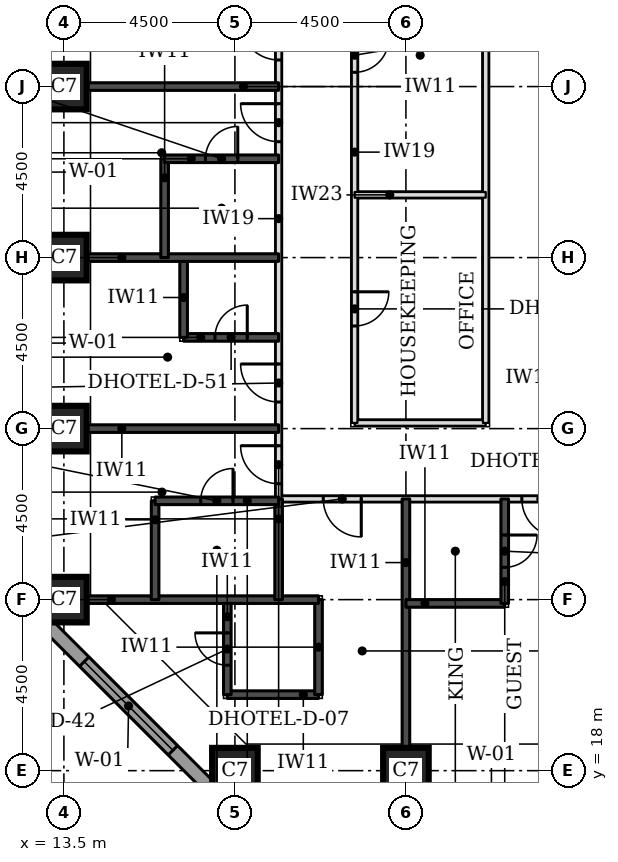
"""IFC4 building model, lengths in metres.
Left out: names, types, materials, properties, quantities, classifications, styles, units other than length and angle.
Written with IfcOpenShell. Run it as: python <this file> out.ifc"""

import sys

from ifc_helpers import new_model, si_unit, direction, frame, frame_2d, origin, origin_2d, place, context, subcontext, project, spatial, rectangle, extrude, element, fill, save


model = new_model("IFC4")
c1 = context("Model", 3, precision=1e-05, world=origin(), true_north=direction((0.0, 1.0)))
c2 = subcontext(c1, "Body", "Model", "MODEL_VIEW")
j1 = project(units=[si_unit("LENGTHUNIT", "METRE"), si_unit("PLANEANGLEUNIT", "RADIAN")], contexts=[c1])
p1 = place(None, origin())
s1 = spatial("IfcSite", under=j1, at=p1, CompositionType="ELEMENT")
p2 = place(p1, origin())
s2 = spatial("IfcBuilding", under=s1, at=p2, CompositionType="ELEMENT")
p3 = place(p2, frame((0.0, 0.0, 59.4)))
s3 = spatial("IfcBuildingStorey", under=s2, at=p3, CompositionType="ELEMENT", Elevation=59.4)
for number, where, z_axis, x_axis in (
    (1, (18.0, 18.0, 0.0), (0.0, 0.0, 1.0), (1.0, 0.0, 0.0)),
    (2, (22.5, 18.0, 0.0), (0.0, 0.0, 1.0), (1.0, 0.0, 0.0)),
    (3, (13.5, 22.5, 0.0), (0.0, 0.0, 1.0), (1.0, 0.0, 0.0)),
    (4, (13.5, 27.0, 0.0), (0.0, 0.0, 1.0), (1.0, 0.0, 0.0)),
    (5, (13.5, 31.5, 0.0), (0.0, 0.0, 1.0), (1.0, 0.0, 0.0)),
    (6, (13.5, 36.0, 0.0), (0.0, 0.0, 1.0), (1.0, 0.0, 0.0)),
):
    element("IfcColumn", number, at=place(p3, frame(where, z_axis=z_axis, x_axis=x_axis)), inside=s3, PredefinedType="COLUMN", context=c2, shape_type="SweptSolid", body=[
        extrude(rectangle(XDim=1.2, YDim=1.2, at=origin_2d()), origin(), (0.0, 0.0, 1.0), 3.3),
    ])
p4 = place(p3, frame((12.674, 22.23, 0.0), z_axis=(0.0, 0.0, 1.0), x_axis=(0.707106781187, -0.707106781187, 0.0)))
e7 = element("IfcWall", 7, at=p4, inside=s3, PredefinedType="STANDARD", context=c2, shape_type="SweptSolid", body=[
    extrude(rectangle(XDim=7.151, YDim=0.35, at=frame_2d((3.576, 0.0))), origin(), (0.0, 0.0, 1.0), 3.055),
])
p5 = place(p4, frame((1.926, 0.0, 0.8)))
e8 = element("IfcOpeningElement", 8, at=p5, cuts=e7, PredefinedType="OPENING", context=c2, shape_type="SweptSolid", body=[
    extrude(rectangle(XDim=3.3, YDim=1.5, at=frame_2d((1.65, 0.75))), frame((0.0, 0.185, 0.0), z_axis=(0.0, -1.0, 0.0), x_axis=(1.0, 0.0, 0.0)), (0.0, 0.0, 1.0), 0.37),
])
p6 = place(p3, frame((19.15, 25.15, 0.0), z_axis=(0.0, 0.0, 1.0), x_axis=(1.0, 0.0, 0.0)))
e9 = element("IfcWall", 9, at=p6, inside=s3, PredefinedType="PARTITIONING", context=c2, shape_type="SweptSolid", body=[
    extrude(rectangle(XDim=32.35, YDim=0.15, at=frame_2d((16.175, 0.0))), origin(), (0.0, 0.0, 1.0), 3.08),
])
p7 = place(p6, frame((6.4, 0.0, 0.0)))
e10 = element("IfcOpeningElement", 10, at=p7, cuts=e9, PredefinedType="OPENING", context=c2, shape_type="SweptSolid", body=[
    extrude(rectangle(XDim=1.0, YDim=2.1, at=frame_2d((0.5, 1.05))), frame((0.0, 0.085, 0.0), z_axis=(0.0, -1.0, 0.0), x_axis=(1.0, 0.0, 0.0)), (0.0, 0.0, 1.0), 0.17),
])
p8 = place(p6, frame((10.5, 0.0, 0.0)))
e11 = element("IfcOpeningElement", 11, at=p8, cuts=e9, PredefinedType="OPENING", context=c2, shape_type="SweptSolid", body=[
    extrude(rectangle(XDim=1.0, YDim=2.1, at=frame_2d((0.5, 1.05))), frame((0.0, 0.085, 0.0), z_axis=(0.0, -1.0, 0.0), x_axis=(1.0, 0.0, 0.0)), (0.0, 0.0, 1.0), 0.17),
])
p9 = place(p6, frame((22.45, 0.0, 0.0)))
e12 = element("IfcOpeningElement", 12, at=p9, cuts=e9, PredefinedType="OPENING", context=c2, shape_type="SweptSolid", body=[
    extrude(rectangle(XDim=1.0, YDim=2.1, at=frame_2d((0.5, 1.05))), frame((0.0, 0.085, 0.0), z_axis=(0.0, -1.0, 0.0), x_axis=(1.0, 0.0, 0.0)), (0.0, 0.0, 1.0), 0.17),
])
p10 = place(p6, frame((26.55, 0.0, 0.0)))
e13 = element("IfcOpeningElement", 13, at=p10, cuts=e9, PredefinedType="OPENING", context=c2, shape_type="SweptSolid", body=[
    extrude(rectangle(XDim=1.0, YDim=2.1, at=frame_2d((0.5, 1.05))), frame((0.0, 0.085, 0.0), z_axis=(0.0, -1.0, 0.0), x_axis=(1.0, 0.0, 0.0)), (0.0, 0.0, 1.0), 0.17),
])
p11 = place(p6, frame((1.175, 0.0, 0.0)))
e14 = element("IfcOpeningElement", 14, at=p11, cuts=e9, PredefinedType="OPENING", context=c2, shape_type="SweptSolid", body=[
    extrude(rectangle(XDim=1.0, YDim=2.1, at=frame_2d((0.5, 1.05))), frame((0.0, 0.085, 0.0), z_axis=(0.0, -1.0, 0.0), x_axis=(1.0, 0.0, 0.0)), (0.0, 0.0, 1.0), 0.17),
])
p12 = place(p6, frame((30.85, 0.0, 0.0)))
e15 = element("IfcOpeningElement", 15, at=p12, cuts=e9, PredefinedType="OPENING", context=c2, shape_type="SweptSolid", body=[
    extrude(rectangle(XDim=1.0, YDim=2.1, at=frame_2d((0.5, 1.05))), frame((0.0, 0.085, 0.0), z_axis=(0.0, -1.0, 0.0), x_axis=(1.0, 0.0, 0.0)), (0.0, 0.0, 1.0), 0.17),
])
p13 = place(p3, frame((19.15, 25.15, 0.0), z_axis=(0.0, 0.0, 1.0), x_axis=(0.0, 1.0, 0.0)))
e16 = element("IfcWall", 16, at=p13, inside=s3, PredefinedType="PARTITIONING", context=c2, shape_type="SweptSolid", body=[
    extrude(rectangle(XDim=24.35, YDim=0.15, at=frame_2d((12.175, 0.0))), origin(), (0.0, 0.0, 1.0), 3.08),
])
p14 = place(p13, frame((0.4, 0.0, 0.0)))
e17 = element("IfcOpeningElement", 17, at=p14, cuts=e16, PredefinedType="OPENING", context=c2, shape_type="SweptSolid", body=[
    extrude(rectangle(XDim=1.0, YDim=2.1, at=frame_2d((0.5, 1.05))), frame((0.0, 0.085, 0.0), z_axis=(0.0, -1.0, 0.0), x_axis=(1.0, 0.0, 0.0)), (0.0, 0.0, 1.0), 0.17),
])
p15 = place(p13, frame((2.55, 0.0, 0.0)))
e18 = element("IfcOpeningElement", 18, at=p15, cuts=e16, PredefinedType="OPENING", context=c2, shape_type="SweptSolid", body=[
    extrude(rectangle(XDim=1.0, YDim=2.1, at=frame_2d((0.5, 1.05))), frame((0.0, 0.085, 0.0), z_axis=(0.0, -1.0, 0.0), x_axis=(1.0, 0.0, 0.0)), (0.0, 0.0, 1.0), 0.17),
])
p16 = place(p13, frame((9.4, 0.0, 0.0)))
e19 = element("IfcOpeningElement", 19, at=p16, cuts=e16, PredefinedType="OPENING", context=c2, shape_type="SweptSolid", body=[
    extrude(rectangle(XDim=1.0, YDim=2.1, at=frame_2d((0.5, 1.05))), frame((0.0, 0.085, 0.0), z_axis=(0.0, -1.0, 0.0), x_axis=(1.0, 0.0, 0.0)), (0.0, 0.0, 1.0), 0.17),
])
p17 = place(p13, frame((11.55, 0.0, 0.0)))
e20 = element("IfcOpeningElement", 20, at=p17, cuts=e16, PredefinedType="OPENING", context=c2, shape_type="SweptSolid", body=[
    extrude(rectangle(XDim=1.0, YDim=2.1, at=frame_2d((0.5, 1.05))), frame((0.0, 0.085, 0.0), z_axis=(0.0, -1.0, 0.0), x_axis=(1.0, 0.0, 0.0)), (0.0, 0.0, 1.0), 0.17),
])
p18 = place(p13, frame((18.4, 0.0, 0.0)))
e21 = element("IfcOpeningElement", 21, at=p18, cuts=e16, PredefinedType="OPENING", context=c2, shape_type="SweptSolid", body=[
    extrude(rectangle(XDim=1.0, YDim=2.1, at=frame_2d((0.5, 1.05))), frame((0.0, 0.085, 0.0), z_axis=(0.0, -1.0, 0.0), x_axis=(1.0, 0.0, 0.0)), (0.0, 0.0, 1.0), 0.17),
])
p19 = place(p13, frame((20.55, 0.0, 0.0)))
e22 = element("IfcOpeningElement", 22, at=p19, cuts=e16, PredefinedType="OPENING", context=c2, shape_type="SweptSolid", body=[
    extrude(rectangle(XDim=1.0, YDim=2.1, at=frame_2d((0.5, 1.05))), frame((0.0, 0.085, 0.0), z_axis=(0.0, -1.0, 0.0), x_axis=(1.0, 0.0, 0.0)), (0.0, 0.0, 1.0), 0.17),
])
p20 = place(p3, frame((21.15, 27.15, 0.0), z_axis=(0.0, 0.0, 1.0), x_axis=(1.0, 0.0, 0.0)))
e23 = element("IfcWall", 23, at=p20, inside=s3, PredefinedType="PARTITIONING", context=c2, shape_type="SweptSolid", body=[
    extrude(rectangle(XDim=3.45, YDim=0.15, at=frame_2d((1.725, 0.0))), origin(), (0.0, 0.0, 1.0), 3.08),
])
p21 = place(p3, frame((21.15, 27.15, 0.0), z_axis=(0.0, 0.0, 1.0), x_axis=(0.0, 1.0, 0.0)))
e24 = element("IfcWall", 24, at=p21, inside=s3, PredefinedType="PARTITIONING", context=c2, shape_type="SweptSolid", body=[
    extrude(rectangle(XDim=15.85, YDim=0.15, at=frame_2d((7.925, 0.0))), origin(), (0.0, 0.0, 1.0), 3.08),
])
p22 = place(p21, frame((2.55, 0.0, 0.0)))
e25 = element("IfcOpeningElement", 25, at=p22, cuts=e24, PredefinedType="OPENING", context=c2, shape_type="SweptSolid", body=[
    extrude(rectangle(XDim=0.9, YDim=2.1, at=frame_2d((0.45, 1.05))), frame((0.0, 0.085, 0.0), z_axis=(0.0, -1.0, 0.0), x_axis=(1.0, 0.0, 0.0)), (0.0, 0.0, 1.0), 0.17),
])
p23 = place(p21, frame((9.225, 0.0, 0.0)))
e26 = element("IfcOpeningElement", 26, at=p23, cuts=e24, PredefinedType="OPENING", context=c2, shape_type="SweptSolid", body=[
    extrude(rectangle(XDim=0.9, YDim=2.1, at=frame_2d((0.45, 1.05))), frame((0.0, 0.085, 0.0), z_axis=(0.0, -1.0, 0.0), x_axis=(1.0, 0.0, 0.0)), (0.0, 0.0, 1.0), 0.17),
])
p24 = place(p3, frame((24.6, 27.15, 0.0), z_axis=(0.0, 0.0, 1.0), x_axis=(0.0, 1.0, 0.0)))
e27 = element("IfcWall", 27, at=p24, inside=s3, PredefinedType="PARTITIONING", context=c2, shape_type="SweptSolid", body=[
    extrude(rectangle(XDim=13.35, YDim=0.15, at=frame_2d((6.675, 0.0))), origin(), (0.0, 0.0, 1.0), 3.08),
])
p25 = place(p3, frame((22.5, 18.6, 0.0), z_axis=(0.0, 0.0, 1.0), x_axis=(0.0, 1.0, 0.0)))
e28 = element("IfcWall", 28, at=p25, inside=s3, PredefinedType="SOLIDWALL", context=c2, shape_type="SweptSolid", body=[
    extrude(rectangle(XDim=6.55, YDim=0.2, at=frame_2d((3.275, 0.0))), origin(), (0.0, 0.0, 1.0), 3.08),
])
p26 = place(p3, frame((17.8, 20.0, 0.0), z_axis=(0.0, 0.0, 1.0), x_axis=(1.0, 0.0, 0.0)))
e29 = element("IfcWall", 29, at=p26, inside=s3, PredefinedType="SOLIDWALL", context=c2, shape_type="SweptSolid", body=[
    extrude(rectangle(XDim=2.4, YDim=0.2, at=frame_2d((1.2, 0.0))), origin(), (0.0, 0.0, 1.0), 3.08),
])
p27 = place(p3, frame((17.8, 20.0, 0.0), z_axis=(0.0, 0.0, 1.0), x_axis=(0.0, 1.0, 0.0)))
e30 = element("IfcWall", 30, at=p27, inside=s3, PredefinedType="SOLIDWALL", context=c2, shape_type="SweptSolid", body=[
    extrude(rectangle(XDim=2.5, YDim=0.2, at=frame_2d((1.25, 0.0))), origin(), (0.0, 0.0, 1.0), 3.08),
])
p28 = place(p27, frame((0.775, 0.0, 0.0)))
e31 = element("IfcOpeningElement", 31, at=p28, cuts=e30, PredefinedType="OPENING", context=c2, shape_type="SweptSolid", body=[
    extrude(rectangle(XDim=0.85, YDim=2.1, at=frame_2d((0.425, 1.05))), frame((0.0, 0.11, 0.0), z_axis=(0.0, -1.0, 0.0), x_axis=(1.0, 0.0, 0.0)), (0.0, 0.0, 1.0), 0.22),
])
p29 = place(p3, frame((20.2, 20.0, 0.0), z_axis=(0.0, 0.0, 1.0), x_axis=(0.0, 1.0, 0.0)))
e32 = element("IfcWall", 32, at=p29, inside=s3, PredefinedType="SOLIDWALL", context=c2, shape_type="SweptSolid", body=[
    extrude(rectangle(XDim=2.5, YDim=0.2, at=frame_2d((1.25, 0.0))), origin(), (0.0, 0.0, 1.0), 3.08),
])
p30 = place(p3, frame((22.5, 22.4, 0.0), z_axis=(0.0, 0.0, 1.0), x_axis=(1.0, 0.0, 0.0)))
e33 = element("IfcWall", 33, at=p30, inside=s3, PredefinedType="SOLIDWALL", context=c2, shape_type="SweptSolid", body=[
    extrude(rectangle(XDim=2.6, YDim=0.2, at=frame_2d((1.3, 0.0))), origin(), (0.0, 0.0, 1.0), 3.08),
])
p31 = place(p3, frame((25.1, 22.4, 0.0), z_axis=(0.0, 0.0, 1.0), x_axis=(0.0, 1.0, 0.0)))
e34 = element("IfcWall", 34, at=p31, inside=s3, PredefinedType="SOLIDWALL", context=c2, shape_type="SweptSolid", body=[
    extrude(rectangle(XDim=2.75, YDim=0.2, at=frame_2d((1.375, 0.0))), origin(), (0.0, 0.0, 1.0), 3.08),
])
p32 = place(p31, frame((0.95, 0.0, 0.0)))
e35 = element("IfcOpeningElement", 35, at=p32, cuts=e34, PredefinedType="OPENING", context=c2, shape_type="SweptSolid", body=[
    extrude(rectangle(XDim=0.85, YDim=2.1, at=frame_2d((0.425, 1.05))), frame((0.0, 0.11, 0.0), z_axis=(0.0, -1.0, 0.0), x_axis=(1.0, 0.0, 0.0)), (0.0, 0.0, 1.0), 0.22),
])
p33 = place(p3, frame((14.1, 22.5, 0.0), z_axis=(0.0, 0.0, 1.0), x_axis=(1.0, 0.0, 0.0)))
e36 = element("IfcWall", 36, at=p33, inside=s3, PredefinedType="SOLIDWALL", context=c2, shape_type="SweptSolid", body=[
    extrude(rectangle(XDim=6.1, YDim=0.2, at=frame_2d((3.05, 0.0))), origin(), (0.0, 0.0, 1.0), 3.08),
])
p34 = place(p3, frame((15.9, 22.5, 0.0), z_axis=(0.0, 0.0, 1.0), x_axis=(0.0, 1.0, 0.0)))
e37 = element("IfcWall", 37, at=p34, inside=s3, PredefinedType="SOLIDWALL", context=c2, shape_type="SweptSolid", body=[
    extrude(rectangle(XDim=2.6, YDim=0.2, at=frame_2d((1.3, 0.0))), origin(), (0.0, 0.0, 1.0), 3.08),
])
p35 = place(p3, frame((19.15, 22.5, 0.0), z_axis=(0.0, 0.0, 1.0), x_axis=(0.0, 1.0, 0.0)))
e38 = element("IfcWall", 38, at=p35, inside=s3, PredefinedType="SOLIDWALL", context=c2, shape_type="SweptSolid", body=[
    extrude(rectangle(XDim=2.65, YDim=0.2, at=frame_2d((1.325, 0.0))), origin(), (0.0, 0.0, 1.0), 3.08),
])
p36 = place(p3, frame((15.9, 25.1, 0.0), z_axis=(0.0, 0.0, 1.0), x_axis=(1.0, 0.0, 0.0)))
e39 = element("IfcWall", 39, at=p36, inside=s3, PredefinedType="SOLIDWALL", context=c2, shape_type="SweptSolid", body=[
    extrude(rectangle(XDim=3.25, YDim=0.2, at=frame_2d((1.625, 0.0))), origin(), (0.0, 0.0, 1.0), 3.08),
])
p37 = place(p36, frame((1.2, 0.0, 0.0)))
e40 = element("IfcOpeningElement", 40, at=p37, cuts=e39, PredefinedType="OPENING", context=c2, shape_type="SweptSolid", body=[
    extrude(rectangle(XDim=0.85, YDim=2.1, at=frame_2d((0.425, 1.05))), frame((0.0, 0.11, 0.0), z_axis=(0.0, -1.0, 0.0), x_axis=(1.0, 0.0, 0.0)), (0.0, 0.0, 1.0), 0.22),
])
p38 = place(p3, frame((14.1, 27.0, 0.0), z_axis=(0.0, 0.0, 1.0), x_axis=(1.0, 0.0, 0.0)))
e41 = element("IfcWall", 41, at=p38, inside=s3, PredefinedType="SOLIDWALL", context=c2, shape_type="SweptSolid", body=[
    extrude(rectangle(XDim=5.05, YDim=0.2, at=frame_2d((2.525, 0.0))), origin(), (0.0, 0.0, 1.0), 3.08),
])
p39 = place(p3, frame((16.65, 29.4, 0.0), z_axis=(0.0, 0.0, 1.0), x_axis=(1.0, 0.0, 0.0)))
e42 = element("IfcWall", 42, at=p39, inside=s3, PredefinedType="SOLIDWALL", context=c2, shape_type="SweptSolid", body=[
    extrude(rectangle(XDim=2.5, YDim=0.2, at=frame_2d((1.25, 0.0))), origin(), (0.0, 0.0, 1.0), 3.08),
])
p40 = place(p39, frame((0.825, 0.0, 0.0)))
e43 = element("IfcOpeningElement", 43, at=p40, cuts=e42, PredefinedType="OPENING", context=c2, shape_type="SweptSolid", body=[
    extrude(rectangle(XDim=0.85, YDim=2.1, at=frame_2d((0.425, 1.05))), frame((0.0, 0.11, 0.0), z_axis=(0.0, -1.0, 0.0), x_axis=(1.0, 0.0, 0.0)), (0.0, 0.0, 1.0), 0.22),
])
p41 = place(p3, frame((16.65, 29.4, 0.0), z_axis=(0.0, 0.0, 1.0), x_axis=(0.0, 1.0, 0.0)))
e44 = element("IfcWall", 44, at=p41, inside=s3, PredefinedType="SOLIDWALL", context=c2, shape_type="SweptSolid", body=[
    extrude(rectangle(XDim=2.1, YDim=0.2, at=frame_2d((1.05, 0.0))), origin(), (0.0, 0.0, 1.0), 3.08),
])
p42 = place(p3, frame((14.1, 31.5, 0.0), z_axis=(0.0, 0.0, 1.0), x_axis=(1.0, 0.0, 0.0)))
e45 = element("IfcWall", 45, at=p42, inside=s3, PredefinedType="SOLIDWALL", context=c2, shape_type="SweptSolid", body=[
    extrude(rectangle(XDim=5.05, YDim=0.2, at=frame_2d((2.525, 0.0))), origin(), (0.0, 0.0, 1.0), 3.08),
])
p43 = place(p3, frame((16.15, 31.5, 0.0), z_axis=(0.0, 0.0, 1.0), x_axis=(0.0, 1.0, 0.0)))
e46 = element("IfcWall", 46, at=p43, inside=s3, PredefinedType="SOLIDWALL", context=c2, shape_type="SweptSolid", body=[
    extrude(rectangle(XDim=2.6, YDim=0.2, at=frame_2d((1.3, 0.0))), origin(), (0.0, 0.0, 1.0), 3.08),
])
p44 = place(p3, frame((16.15, 34.1, 0.0), z_axis=(0.0, 0.0, 1.0), x_axis=(1.0, 0.0, 0.0)))
e47 = element("IfcWall", 47, at=p44, inside=s3, PredefinedType="SOLIDWALL", context=c2, shape_type="SweptSolid", body=[
    extrude(rectangle(XDim=3.0, YDim=0.2, at=frame_2d((1.5, 0.0))), origin(), (0.0, 0.0, 1.0), 3.08),
])
p45 = place(p44, frame((1.075, 0.0, 0.0)))
e48 = element("IfcOpeningElement", 48, at=p45, cuts=e47, PredefinedType="OPENING", context=c2, shape_type="SweptSolid", body=[
    extrude(rectangle(XDim=0.85, YDim=2.1, at=frame_2d((0.425, 1.05))), frame((0.0, 0.11, 0.0), z_axis=(0.0, -1.0, 0.0), x_axis=(1.0, 0.0, 0.0)), (0.0, 0.0, 1.0), 0.22),
])
p46 = place(p3, frame((14.1, 36.0, 0.0), z_axis=(0.0, 0.0, 1.0), x_axis=(1.0, 0.0, 0.0)))
e49 = element("IfcWall", 49, at=p46, inside=s3, PredefinedType="SOLIDWALL", context=c2, shape_type="SweptSolid", body=[
    extrude(rectangle(XDim=5.05, YDim=0.2, at=frame_2d((2.525, 0.0))), origin(), (0.0, 0.0, 1.0), 3.08),
])
p47 = place(p3, frame((21.15, 33.15, 0.0), z_axis=(0.0, 0.0, 1.0), x_axis=(1.0, 0.0, 0.0)))
e50 = element("IfcWall", 50, at=p47, inside=s3, PredefinedType="PARTITIONING", context=c2, shape_type="SweptSolid", body=[
    extrude(rectangle(XDim=3.45, YDim=0.15, at=frame_2d((1.725, 0.0))), origin(), (0.0, 0.0, 1.0), 3.08),
])
p48 = place(p5, origin())
e51 = element("IfcWindow", 51, at=p48, inside=s3, PartitioningType="SINGLE_PANEL", PredefinedType="WINDOW", context=c2, shape_type="SweptSolid", body=[
    extrude(rectangle(XDim=3.3, YDim=1.5, at=frame_2d((1.65, 0.75))), frame((0.0, 0.085, 0.0), z_axis=(0.0, -1.0, 0.0), x_axis=(1.0, 0.0, 0.0)), (0.0, 0.0, 1.0), 0.06),
])
fill(e8, e51)
p49 = place(p7, frame((1.0, 0.0, 0.0), z_axis=(0.0, 0.0, 1.0), x_axis=(-1.0, 0.0, 0.0)))
e52 = element("IfcDoor", 52, at=p49, inside=s3, OperationType="SINGLE_SWING_LEFT", PredefinedType="DOOR", context=c2, shape_type="SweptSolid", body=[
    extrude(rectangle(XDim=1.0, YDim=2.1, at=frame_2d((0.5, 1.05))), frame((0.0, 0.025, 0.0), z_axis=(0.0, -1.0, 0.0), x_axis=(1.0, 0.0, 0.0)), (0.0, 0.0, 1.0), 0.05),
])
fill(e10, e52)
p50 = place(p32, frame((0.85, 0.0, 0.0), z_axis=(0.0, 0.0, 1.0), x_axis=(-1.0, 0.0, 0.0)))
e53 = element("IfcDoor", 53, at=p50, inside=s3, OperationType="SINGLE_SWING_LEFT", PredefinedType="DOOR", context=c2, shape_type="SweptSolid", body=[
    extrude(rectangle(XDim=0.85, YDim=2.1, at=frame_2d((0.425, 1.05))), frame((0.0, 0.025, 0.0), z_axis=(0.0, -1.0, 0.0), x_axis=(1.0, 0.0, 0.0)), (0.0, 0.0, 1.0), 0.05),
])
fill(e35, e53)
p51 = place(p14, origin())
e54 = element("IfcDoor", 54, at=p51, inside=s3, OperationType="SINGLE_SWING_RIGHT", PredefinedType="DOOR", context=c2, shape_type="SweptSolid", body=[
    extrude(rectangle(XDim=1.0, YDim=2.1, at=frame_2d((0.5, 1.05))), frame((0.0, 0.025, 0.0), z_axis=(0.0, -1.0, 0.0), x_axis=(1.0, 0.0, 0.0)), (0.0, 0.0, 1.0), 0.05),
])
fill(e17, e54)
p52 = place(p37, origin())
e55 = element("IfcDoor", 55, at=p52, inside=s3, OperationType="SINGLE_SWING_RIGHT", PredefinedType="DOOR", context=c2, shape_type="SweptSolid", body=[
    extrude(rectangle(XDim=0.85, YDim=2.1, at=frame_2d((0.425, 1.05))), frame((0.0, 0.025, 0.0), z_axis=(0.0, -1.0, 0.0), x_axis=(1.0, 0.0, 0.0)), (0.0, 0.0, 1.0), 0.05),
])
fill(e40, e55)
p53 = place(p15, origin())
e56 = element("IfcDoor", 56, at=p53, inside=s3, OperationType="SINGLE_SWING_RIGHT", PredefinedType="DOOR", context=c2, shape_type="SweptSolid", body=[
    extrude(rectangle(XDim=1.0, YDim=2.1, at=frame_2d((0.5, 1.05))), frame((0.0, 0.025, 0.0), z_axis=(0.0, -1.0, 0.0), x_axis=(1.0, 0.0, 0.0)), (0.0, 0.0, 1.0), 0.05),
])
fill(e18, e56)
p54 = place(p40, origin())
e57 = element("IfcDoor", 57, at=p54, inside=s3, OperationType="SINGLE_SWING_RIGHT", PredefinedType="DOOR", context=c2, shape_type="SweptSolid", body=[
    extrude(rectangle(XDim=0.85, YDim=2.1, at=frame_2d((0.425, 1.05))), frame((0.0, 0.025, 0.0), z_axis=(0.0, -1.0, 0.0), x_axis=(1.0, 0.0, 0.0)), (0.0, 0.0, 1.0), 0.05),
])
fill(e43, e57)
p55 = place(p16, origin())
e58 = element("IfcDoor", 58, at=p55, inside=s3, OperationType="SINGLE_SWING_RIGHT", PredefinedType="DOOR", context=c2, shape_type="SweptSolid", body=[
    extrude(rectangle(XDim=1.0, YDim=2.1, at=frame_2d((0.5, 1.05))), frame((0.0, 0.025, 0.0), z_axis=(0.0, -1.0, 0.0), x_axis=(1.0, 0.0, 0.0)), (0.0, 0.0, 1.0), 0.05),
])
fill(e19, e58)
p56 = place(p45, origin())
e59 = element("IfcDoor", 59, at=p56, inside=s3, OperationType="SINGLE_SWING_RIGHT", PredefinedType="DOOR", context=c2, shape_type="SweptSolid", body=[
    extrude(rectangle(XDim=0.85, YDim=2.1, at=frame_2d((0.425, 1.05))), frame((0.0, 0.025, 0.0), z_axis=(0.0, -1.0, 0.0), x_axis=(1.0, 0.0, 0.0)), (0.0, 0.0, 1.0), 0.05),
])
fill(e48, e59)
p57 = place(p17, origin())
e60 = element("IfcDoor", 60, at=p57, inside=s3, OperationType="SINGLE_SWING_RIGHT", PredefinedType="DOOR", context=c2, shape_type="SweptSolid", body=[
    extrude(rectangle(XDim=1.0, YDim=2.1, at=frame_2d((0.5, 1.05))), frame((0.0, 0.025, 0.0), z_axis=(0.0, -1.0, 0.0), x_axis=(1.0, 0.0, 0.0)), (0.0, 0.0, 1.0), 0.05),
])
fill(e20, e60)
p58 = place(p11, frame((1.0, 0.0, 0.0), z_axis=(0.0, 0.0, 1.0), x_axis=(-1.0, 0.0, 0.0)))
e61 = element("IfcDoor", 61, at=p58, inside=s3, OperationType="SINGLE_SWING_LEFT", PredefinedType="DOOR", context=c2, shape_type="SweptSolid", body=[
    extrude(rectangle(XDim=1.0, YDim=2.1, at=frame_2d((0.5, 1.05))), frame((0.0, 0.025, 0.0), z_axis=(0.0, -1.0, 0.0), x_axis=(1.0, 0.0, 0.0)), (0.0, 0.0, 1.0), 0.05),
])
fill(e14, e61)
p59 = place(p28, origin())
e62 = element("IfcDoor", 62, at=p59, inside=s3, OperationType="SINGLE_SWING_RIGHT", PredefinedType="DOOR", context=c2, shape_type="SweptSolid", body=[
    extrude(rectangle(XDim=0.85, YDim=2.1, at=frame_2d((0.425, 1.05))), frame((0.0, 0.025, 0.0), z_axis=(0.0, -1.0, 0.0), x_axis=(1.0, 0.0, 0.0)), (0.0, 0.0, 1.0), 0.05),
])
fill(e31, e62)
p60 = place(p22, frame((0.9, 0.0, 0.0), z_axis=(0.0, 0.0, 1.0), x_axis=(-1.0, 0.0, 0.0)))
e63 = element("IfcDoor", 63, at=p60, inside=s3, OperationType="SINGLE_SWING_LEFT", PredefinedType="DOOR", context=c2, shape_type="SweptSolid", body=[
    extrude(rectangle(XDim=0.9, YDim=2.1, at=frame_2d((0.45, 1.05))), frame((0.0, 0.025, 0.0), z_axis=(0.0, -1.0, 0.0), x_axis=(1.0, 0.0, 0.0)), (0.0, 0.0, 1.0), 0.05),
])
fill(e25, e63)
p61 = place(p23, frame((0.9, 0.0, 0.0), z_axis=(0.0, 0.0, 1.0), x_axis=(-1.0, 0.0, 0.0)))
e64 = element("IfcDoor", 64, at=p61, inside=s3, OperationType="SINGLE_SWING_LEFT", PredefinedType="DOOR", context=c2, shape_type="SweptSolid", body=[
    extrude(rectangle(XDim=0.9, YDim=2.1, at=frame_2d((0.45, 1.05))), frame((0.0, 0.025, 0.0), z_axis=(0.0, -1.0, 0.0), x_axis=(1.0, 0.0, 0.0)), (0.0, 0.0, 1.0), 0.05),
])
fill(e26, e64)
save(model, sys.argv[1])
